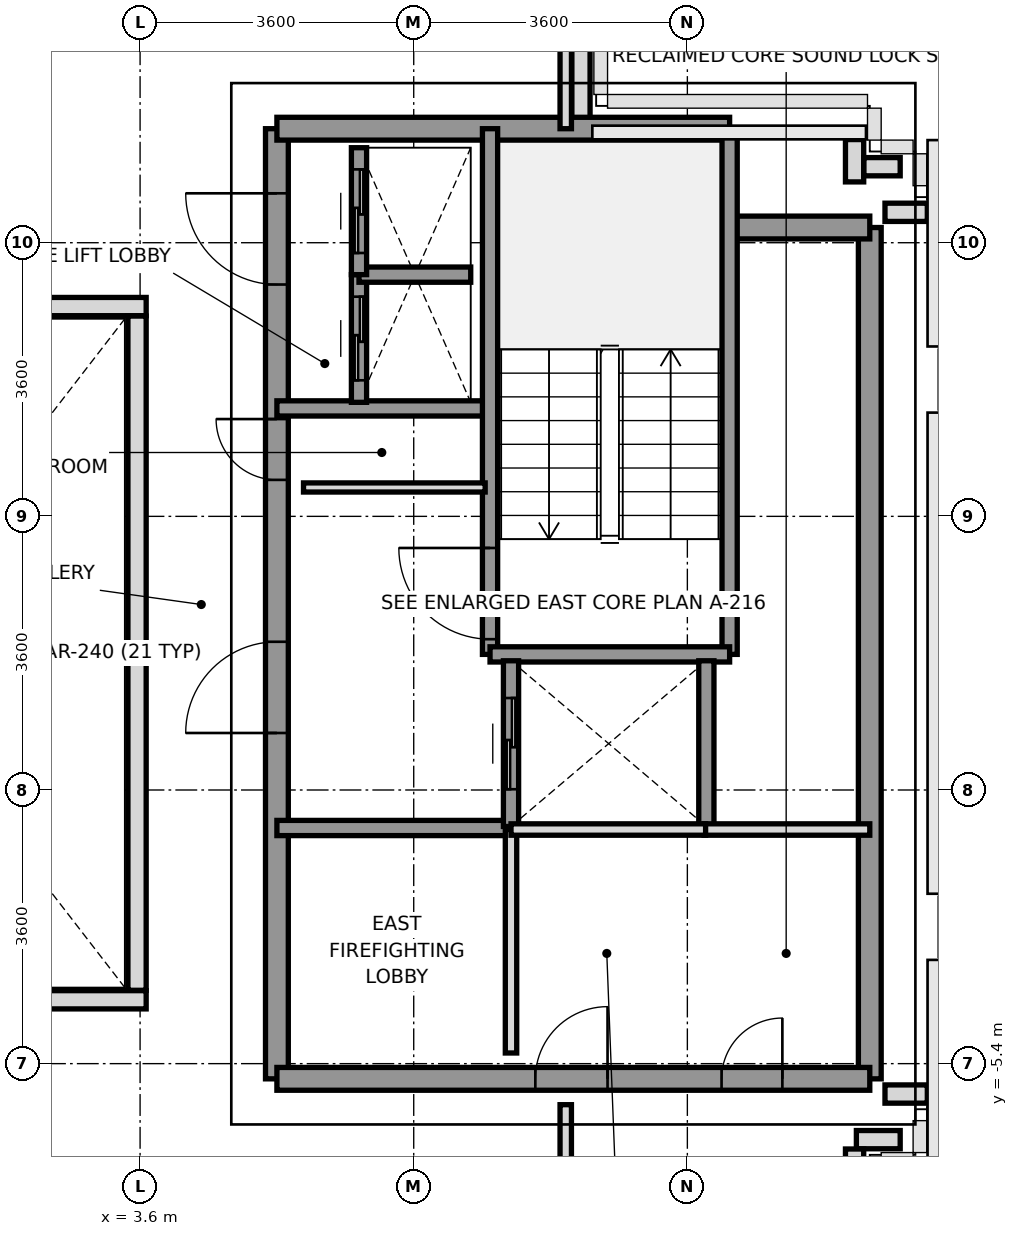
"""IFC4 building model, lengths in metres.
Left out: names, types, materials, properties, quantities, classifications, styles, units other than length and angle.
Written with IfcOpenShell. Run it as: python <this file> out.ifc"""

import sys

from ifc_helpers import new_model, si_unit, direction, frame, frame_2d, origin, place, context, subcontext, project, spatial, rectangle, extrude, source, transform, mapped, element, fill, save


model = new_model("IFC4")
c1 = context("Model", 3, precision=1e-05, world=origin(), true_north=direction((0.0, 1.0)))
c2 = subcontext(c1, "Body", "Model", "MODEL_VIEW")
j1 = project(units=[si_unit("LENGTHUNIT", "METRE"), si_unit("PLANEANGLEUNIT", "RADIAN")], contexts=[c1])
p1 = place(None, origin())
s1 = spatial("IfcSite", under=j1, at=p1, CompositionType="ELEMENT")
p2 = place(p1, origin())
s2 = spatial("IfcBuilding", under=s1, at=p2, CompositionType="ELEMENT")
p3 = place(p2, frame((0.0, 0.0, 265.2)))
s3 = spatial("IfcBuildingStorey", under=s2, at=p3, CompositionType="ELEMENT", Elevation=265.2)
p4 = place(p3, frame((13.957, -5.8, 0.0), z_axis=(0.0, 0.0, 1.0), x_axis=(-1.0, 0.0, 0.0)))
e1 = element("IfcWall", 1, at=p4, inside=s3, PredefinedType="PARAPET", context=c2, shape_type="SweptSolid", body=[
    extrude(rectangle(XDim=0.557, YDim=0.24, at=frame_2d((0.279, 0.0))), origin(), (0.0, 0.0, 1.0), 1.15),
])
p5 = place(p3, frame((13.6, -6.4, 0.0), z_axis=(0.0, 0.0, 1.0), x_axis=(-1.0, 0.0, 0.0)))
e2 = element("IfcWall", 2, at=p5, inside=s3, PredefinedType="PARAPET", context=c2, shape_type="SweptSolid", body=[
    extrude(rectangle(XDim=0.576, YDim=0.24, at=frame_2d((0.288, 0.0))), origin(), (0.0, 0.0, 1.0), 1.15),
])
p6 = place(p3, frame((13.0, -6.523, 0.0), z_axis=(0.0, 0.0, 1.0), x_axis=(0.0, -1.0, 0.0)))
e3 = element("IfcWall", 3, at=p6, inside=s3, PredefinedType="PARAPET", context=c2, shape_type="SweptSolid", body=[
    extrude(rectangle(XDim=0.234, YDim=0.24, at=frame_2d((0.117, 0.0))), origin(), (0.0, 0.0, 1.0), 1.15),
])
p7 = place(p3, frame((9.4, 8.622, 0.0), z_axis=(0.0, 0.0, 1.0), x_axis=(0.0, -1.0, 0.0)))
e4 = element("IfcWall", 4, at=p7, inside=s3, PredefinedType="PARAPET", context=c2, shape_type="SweptSolid", body=[
    extrude(rectangle(XDim=1.669, YDim=0.24, at=frame_2d((0.834, 0.0))), origin(), (0.0, 0.0, 1.0), 1.15),
])
p8 = place(p3, frame((13.0, 6.757, 0.0), z_axis=(0.0, 0.0, 1.0), x_axis=(0.0, -1.0, 0.0)))
e5 = element("IfcWall", 5, at=p8, inside=s3, PredefinedType="PARAPET", context=c2, shape_type="SweptSolid", body=[
    extrude(rectangle(XDim=0.557, YDim=0.24, at=frame_2d((0.279, 0.0))), origin(), (0.0, 0.0, 1.0), 1.15),
])
p9 = place(p3, frame((13.123, 6.4, 0.0), z_axis=(0.0, 0.0, 1.0), x_axis=(1.0, 0.0, 0.0)))
e6 = element("IfcWall", 6, at=p9, inside=s3, PredefinedType="PARAPET", context=c2, shape_type="SweptSolid", body=[
    extrude(rectangle(XDim=0.477, YDim=0.24, at=frame_2d((0.239, 0.0))), origin(), (0.0, 0.0, 1.0), 1.15),
])
p10 = place(p3, frame((13.4, 5.8, 0.0), z_axis=(0.0, 0.0, 1.0), x_axis=(1.0, 0.0, 0.0)))
e7 = element("IfcWall", 7, at=p10, inside=s3, PredefinedType="PARAPET", context=c2, shape_type="SweptSolid", body=[
    extrude(rectangle(XDim=0.557, YDim=0.24, at=frame_2d((0.279, 0.0))), origin(), (0.0, 0.0, 1.0), 1.15),
])
p11 = place(p3, frame((13.2, -5.6, 0.0), z_axis=(0.0, 0.0, 1.0), x_axis=(0.0, 1.0, 0.0)))
e8 = element("IfcWall", 8, at=p11, inside=s3, PredefinedType="SHEAR", context=c2, shape_type="SweptSolid", body=[
    extrude(rectangle(XDim=11.2, YDim=0.3, at=frame_2d((5.6, 0.0))), origin(), (0.0, 0.0, 1.0), 3.01),
])
p12 = place(p3, frame((5.4, -5.6, 0.0), z_axis=(0.0, 0.0, 1.0), x_axis=(0.0, 1.0, 0.0)))
e9 = element("IfcWall", 9, at=p12, inside=s3, PredefinedType="SHEAR", context=c2, shape_type="SweptSolid", body=[
    extrude(rectangle(XDim=12.5, YDim=0.3, at=frame_2d((6.25, 0.0))), origin(), (0.0, 0.0, 1.0), 3.01),
])
p13 = place(p12, frame((4.55, 0.0, 0.0)))
e10 = element("IfcOpeningElement", 10, at=p13, cuts=e9, PredefinedType="OPENING", context=c2, shape_type="SweptSolid", body=[
    extrude(rectangle(XDim=1.2, YDim=2.2, at=frame_2d((0.6, 1.1))), frame((0.0, 0.16, 0.0), z_axis=(0.0, -1.0, 0.0), x_axis=(1.0, 0.0, 0.0)), (0.0, 0.0, 1.0), 0.32),
])
p14 = place(p12, frame((10.45, 0.0, 0.0)))
e11 = element("IfcOpeningElement", 11, at=p14, cuts=e9, PredefinedType="OPENING", context=c2, shape_type="SweptSolid", body=[
    extrude(rectangle(XDim=1.2, YDim=2.2, at=frame_2d((0.6, 1.1))), frame((0.0, 0.16, 0.0), z_axis=(0.0, -1.0, 0.0), x_axis=(1.0, 0.0, 0.0)), (0.0, 0.0, 1.0), 0.32),
])
p15 = place(p12, frame((7.88, 0.0, 0.0)))
e12 = element("IfcOpeningElement", 12, at=p15, cuts=e9, PredefinedType="OPENING", context=c2, shape_type="SweptSolid", body=[
    extrude(rectangle(XDim=0.8, YDim=2.1, at=frame_2d((0.4, 1.05))), frame((0.0, 0.16, 0.0), z_axis=(0.0, -1.0, 0.0), x_axis=(1.0, 0.0, 0.0)), (0.0, 0.0, 1.0), 0.32),
])
p16 = place(p3, frame((5.4, 6.9, 0.0), z_axis=(0.0, 0.0, 1.0), x_axis=(1.0, 0.0, 0.0)))
e13 = element("IfcWall", 13, at=p16, inside=s3, PredefinedType="SHEAR", context=c2, shape_type="SweptSolid", body=[
    extrude(rectangle(XDim=5.956, YDim=0.3, at=frame_2d((2.978, 0.0))), origin(), (0.0, 0.0, 1.0), 3.01),
])
p17 = place(p3, frame((11.356, 5.6, 0.0), z_axis=(0.0, 0.0, 1.0), x_axis=(1.0, 0.0, 0.0)))
e14 = element("IfcWall", 14, at=p17, inside=s3, PredefinedType="SHEAR", context=c2, shape_type="SweptSolid", body=[
    extrude(rectangle(XDim=1.844, YDim=0.3, at=frame_2d((0.922, 0.0))), origin(), (0.0, 0.0, 1.0), 3.01),
])
p18 = place(p3, frame((5.4, -5.6, 0.0), z_axis=(0.0, 0.0, 1.0), x_axis=(1.0, 0.0, 0.0)))
e15 = element("IfcWall", 15, at=p18, inside=s3, PredefinedType="SHEAR", context=c2, shape_type="SweptSolid", body=[
    extrude(rectangle(XDim=7.8, YDim=0.3, at=frame_2d((3.9, 0.0))), origin(), (0.0, 0.0, 1.0), 3.01),
])
p19 = place(p18, frame((5.85, 0.0, 0.0)))
e16 = element("IfcOpeningElement", 16, at=p19, cuts=e15, PredefinedType="OPENING", context=c2, shape_type="SweptSolid", body=[
    extrude(rectangle(XDim=0.8, YDim=2.1, at=frame_2d((0.4, 1.05))), frame((0.0, 0.16, 0.0), z_axis=(0.0, -1.0, 0.0), x_axis=(1.0, 0.0, 0.0)), (0.0, 0.0, 1.0), 0.32),
])
p20 = place(p18, frame((3.4, 0.0, 0.0)))
e17 = element("IfcOpeningElement", 17, at=p20, cuts=e15, PredefinedType="OPENING", context=c2, shape_type="SweptSolid", body=[
    extrude(rectangle(XDim=0.95, YDim=2.15, at=frame_2d((0.475, 1.075))), frame((0.0, 0.16, 0.0), z_axis=(0.0, -1.0, 0.0), x_axis=(1.0, 0.0, 0.0)), (0.0, 0.0, 1.0), 0.32),
])
p21 = place(p3, frame((5.4, 3.22, 0.0), z_axis=(0.0, 0.0, 1.0), x_axis=(1.0, 0.0, 0.0)))
e18 = element("IfcWall", 18, at=p21, inside=s3, PredefinedType="SOLIDWALL", context=c2, shape_type="SweptSolid", body=[
    extrude(rectangle(XDim=2.78, YDim=0.2, at=frame_2d((1.39, 0.0))), origin(), (0.0, 0.0, 1.0), 3.01),
])
p22 = place(p3, frame((5.4, -2.3, 0.0), z_axis=(0.0, 0.0, 1.0), x_axis=(1.0, 0.0, 0.0)))
e19 = element("IfcWall", 19, at=p22, inside=s3, PredefinedType="SOLIDWALL", context=c2, shape_type="SweptSolid", body=[
    extrude(rectangle(XDim=3.08, YDim=0.2, at=frame_2d((1.54, 0.0))), origin(), (0.0, 0.0, 1.0), 3.01),
])
p23 = place(p3, frame((8.204, -0.016, 0.0), z_axis=(0.0, 0.0, 1.0), x_axis=(0.0, 1.0, 0.0)))
e20 = element("IfcWall", 20, at=p23, inside=s3, PredefinedType="SOLIDWALL", context=c2, shape_type="SweptSolid", body=[
    extrude(rectangle(XDim=6.916, YDim=0.2, at=frame_2d((3.458, 0.0))), origin(), (0.0, 0.0, 1.0), 3.01),
])
p24 = place(p23, frame((0.2, 0.0, 0.0)))
e21 = element("IfcOpeningElement", 21, at=p24, cuts=e20, PredefinedType="OPENING", context=c2, shape_type="SweptSolid", body=[
    extrude(rectangle(XDim=1.2, YDim=2.2, at=frame_2d((0.6, 1.1))), frame((0.0, 0.11, 0.0), z_axis=(0.0, -1.0, 0.0), x_axis=(1.0, 0.0, 0.0)), (0.0, 0.0, 1.0), 0.22),
])
p25 = place(p3, frame((11.356, -0.016, 0.0), z_axis=(0.0, 0.0, 1.0), x_axis=(0.0, 1.0, 0.0)))
e22 = element("IfcWall", 22, at=p25, inside=s3, PredefinedType="SOLIDWALL", context=c2, shape_type="SweptSolid", body=[
    extrude(rectangle(XDim=6.916, YDim=0.2, at=frame_2d((3.458, 0.0))), origin(), (0.0, 0.0, 1.0), 3.01),
])
p26 = place(p3, frame((8.204, -0.016, 0.0), z_axis=(0.0, 0.0, 1.0), x_axis=(1.0, 0.0, 0.0)))
e23 = element("IfcWall", 23, at=p26, inside=s3, PredefinedType="SOLIDWALL", context=c2, shape_type="SweptSolid", body=[
    extrude(rectangle(XDim=3.152, YDim=0.2, at=frame_2d((1.576, 0.0))), origin(), (0.0, 0.0, 1.0), 3.01),
])
p27 = place(p3, frame((8.48, -2.28, 0.0), z_axis=(0.0, 0.0, 1.0), x_axis=(0.0, 1.0, 0.0)))
e24 = element("IfcWall", 24, at=p27, inside=s3, PredefinedType="SOLIDWALL", context=c2, shape_type="SweptSolid", body=[
    extrude(rectangle(XDim=2.18, YDim=0.2, at=frame_2d((1.09, 0.0))), origin(), (0.0, 0.0, 1.0), 3.01),
])
p28 = place(p27, frame((0.49, 0.0, 0.0)))
e25 = element("IfcOpeningElement", 25, at=p28, cuts=e24, PredefinedType="OPENING", context=c2, shape_type="SweptSolid", body=[
    extrude(rectangle(XDim=1.2, YDim=2.2, at=frame_2d((0.6, 1.1))), frame((0.0, 0.11, 0.0), z_axis=(0.0, -1.0, 0.0), x_axis=(1.0, 0.0, 0.0)), (0.0, 0.0, 1.0), 0.22),
])
p29 = place(p3, frame((11.05, -2.28, 0.0), z_axis=(0.0, 0.0, 1.0), x_axis=(0.0, 1.0, 0.0)))
e26 = element("IfcWall", 26, at=p29, inside=s3, PredefinedType="SOLIDWALL", context=c2, shape_type="SweptSolid", body=[
    extrude(rectangle(XDim=2.18, YDim=0.2, at=frame_2d((1.09, 0.0))), origin(), (0.0, 0.0, 1.0), 3.01),
])
p30 = place(p3, frame((6.48, 3.3, 0.0), z_axis=(0.0, 0.0, 1.0), x_axis=(0.0, 1.0, 0.0)))
e27 = element("IfcWall", 27, at=p30, inside=s3, PredefinedType="SOLIDWALL", context=c2, shape_type="SweptSolid", body=[
    extrude(rectangle(XDim=1.68, YDim=0.2, at=frame_2d((0.84, 0.0))), origin(), (0.0, 0.0, 1.0), 3.01),
])
p31 = place(p30, frame((0.29, 0.0, 0.0)))
e28 = element("IfcOpeningElement", 28, at=p31, cuts=e27, PredefinedType="OPENING", context=c2, shape_type="SweptSolid", body=[
    extrude(rectangle(XDim=1.1, YDim=2.2, at=frame_2d((0.55, 1.1))), frame((0.0, 0.11, 0.0), z_axis=(0.0, -1.0, 0.0), x_axis=(1.0, 0.0, 0.0)), (0.0, 0.0, 1.0), 0.22),
])
p32 = place(p3, frame((6.48, 4.98, 0.0), z_axis=(0.0, 0.0, 1.0), x_axis=(1.0, 0.0, 0.0)))
e29 = element("IfcWall", 29, at=p32, inside=s3, PredefinedType="SOLIDWALL", context=c2, shape_type="SweptSolid", body=[
    extrude(rectangle(XDim=1.47, YDim=0.2, at=frame_2d((0.735, 0.0))), origin(), (0.0, 0.0, 1.0), 3.01),
])
p33 = place(p3, frame((6.48, 4.98, 0.0), z_axis=(0.0, 0.0, 1.0), x_axis=(0.0, 1.0, 0.0)))
e30 = element("IfcWall", 30, at=p33, inside=s3, PredefinedType="SOLIDWALL", context=c2, shape_type="SweptSolid", body=[
    extrude(rectangle(XDim=1.67, YDim=0.2, at=frame_2d((0.835, 0.0))), origin(), (0.0, 0.0, 1.0), 3.01),
])
p34 = place(p33, frame((0.285, 0.0, 0.0)))
e31 = element("IfcOpeningElement", 31, at=p34, cuts=e30, PredefinedType="OPENING", context=c2, shape_type="SweptSolid", body=[
    extrude(rectangle(XDim=1.1, YDim=2.2, at=frame_2d((0.55, 1.1))), frame((0.0, 0.11, 0.0), z_axis=(0.0, -1.0, 0.0), x_axis=(1.0, 0.0, 0.0)), (0.0, 0.0, 1.0), 0.22),
])
p35 = place(p3, frame((5.75, 2.18, 0.0), z_axis=(0.0, 0.0, 1.0), x_axis=(1.0, 0.0, 0.0)))
e32 = element("IfcWall", 32, at=p35, inside=s3, PredefinedType="PARTITIONING", context=c2, shape_type="SweptSolid", body=[
    extrude(rectangle(XDim=2.39, YDim=0.12, at=frame_2d((1.195, 0.0))), origin(), (0.0, 0.0, 1.0), 3.01),
])
p36 = place(p3, frame((11.02, -2.32, 0.0), z_axis=(0.0, 0.0, 1.0), x_axis=(1.0, 0.0, 0.0)))
e33 = element("IfcWall", 33, at=p36, inside=s3, PredefinedType="PARTITIONING", context=c2, shape_type="SweptSolid", body=[
    extrude(rectangle(XDim=2.18, YDim=0.15, at=frame_2d((1.09, 0.0))), origin(), (0.0, 0.0, 1.0), 3.01),
])
p37 = place(p3, frame((8.48, -5.26, 0.0), z_axis=(0.0, 0.0, 1.0), x_axis=(0.0, 1.0, 0.0)))
e34 = element("IfcWall", 34, at=p37, inside=s3, PredefinedType="PARTITIONING", context=c2, shape_type="SweptSolid", body=[
    extrude(rectangle(XDim=2.94, YDim=0.15, at=frame_2d((1.47, 0.0))), origin(), (0.0, 0.0, 1.0), 3.01),
])
p38 = place(p3, frame((8.48, -2.32, 0.0), z_axis=(0.0, 0.0, 1.0), x_axis=(1.0, 0.0, 0.0)))
e35 = element("IfcWall", 35, at=p38, inside=s3, PredefinedType="PARTITIONING", context=c2, shape_type="SweptSolid", body=[
    extrude(rectangle(XDim=2.56, YDim=0.15, at=frame_2d((1.28, 0.0))), origin(), (0.0, 0.0, 1.0), 3.01),
])
p39 = place(p3, frame((9.2, 6.9, 0.0), z_axis=(0.0, 0.0, 1.0), x_axis=(0.0, 1.0, 0.0)))
e36 = element("IfcWall", 36, at=p39, inside=s3, PredefinedType="PARTITIONING", context=c2, shape_type="SweptSolid", body=[
    extrude(rectangle(XDim=3.38, YDim=0.15, at=frame_2d((1.69, 0.0))), origin(), (0.0, 0.0, 1.0), 2.61),
])
p40 = place(p3, frame((9.2, -10.28, 0.0), z_axis=(0.0, 0.0, 1.0), x_axis=(0.0, 1.0, 0.0)))
e37 = element("IfcWall", 37, at=p40, inside=s3, PredefinedType="PARTITIONING", context=c2, shape_type="SweptSolid", body=[
    extrude(rectangle(XDim=4.34, YDim=0.15, at=frame_2d((2.17, 0.0))), origin(), (0.0, 0.0, 1.0), 2.61),
])
for number, where, z_axis, x_axis in (
    (38, (-3.68, -4.56, 0.0), (0.0, 0.0, 1.0), (1.0, 0.0, 0.0)),
    (39, (-3.68, 4.56, 0.0), (0.0, 0.0, 1.0), (1.0, 0.0, 0.0)),
):
    element("IfcWall", number, at=place(p3, frame(where, z_axis=z_axis, x_axis=x_axis)), inside=s3, PredefinedType="PARAPET", context=c2, shape_type="SweptSolid", body=[
        extrude(rectangle(XDim=7.36, YDim=0.24, at=frame_2d((3.68, 0.0))), origin(), (0.0, 0.0, 1.0), 1.15),
    ])
p41 = place(p3, frame((3.56, -4.435, 0.0), z_axis=(0.0, 0.0, 1.0), x_axis=(0.0, 1.0, 0.0)))
e40 = element("IfcWall", 40, at=p41, inside=s3, PredefinedType="PARAPET", context=c2, shape_type="SweptSolid", body=[
    extrude(rectangle(XDim=8.87, YDim=0.24, at=frame_2d((4.435, 0.0))), origin(), (0.0, 0.0, 1.0), 1.15),
])
m1 = source(origin(), c2, "Body", "SweptSolid", [
    extrude(rectangle(XDim=1.2, YDim=2.2, at=frame_2d((0.6, 1.1))), frame((0.0, 0.025, 0.0), z_axis=(0.0, -1.0, 0.0), x_axis=(1.0, 0.0, 0.0)), (0.0, 0.0, 1.0), 0.05),
])
p42 = place(p24, origin())
e41 = element("IfcDoor", 41, at=p42, inside=s3, OperationType="SINGLE_SWING_RIGHT", PredefinedType="DOOR", context=c2, shape_type="MappedRepresentation", body=[
    mapped(m1, transform((0.0, 0.0, 0.0), x_axis=(1.0, 0.0, 0.0), y_axis=(0.0, 1.0, 0.0), z_axis=(0.0, 0.0, 1.0), scale=1.0)),
])
fill(e21, e41)
p43 = place(p13, origin())
e42 = element("IfcDoor", 42, at=p43, inside=s3, OperationType="SINGLE_SWING_LEFT", PredefinedType="DOOR", context=c2, shape_type="MappedRepresentation", body=[
    mapped(m1, transform((0.0, 0.0, 0.0), x_axis=(1.0, 0.0, 0.0), y_axis=(0.0, 1.0, 0.0), z_axis=(0.0, 0.0, 1.0), scale=1.0)),
])
fill(e10, e42)
p44 = place(p14, origin())
e43 = element("IfcDoor", 43, at=p44, inside=s3, OperationType="SINGLE_SWING_RIGHT", PredefinedType="DOOR", context=c2, shape_type="MappedRepresentation", body=[
    mapped(m1, transform((0.0, 0.0, 0.0), x_axis=(1.0, 0.0, 0.0), y_axis=(0.0, 1.0, 0.0), z_axis=(0.0, 0.0, 1.0), scale=1.0)),
])
fill(e11, e43)
m2 = source(origin(), c2, "Body", "SweptSolid", [
    extrude(rectangle(XDim=0.8, YDim=2.1, at=frame_2d((0.4, 1.05))), frame((0.0, 0.025, 0.0), z_axis=(0.0, -1.0, 0.0), x_axis=(1.0, 0.0, 0.0)), (0.0, 0.0, 1.0), 0.05),
])
p45 = place(p15, origin())
e44 = element("IfcDoor", 44, at=p45, inside=s3, OperationType="SINGLE_SWING_RIGHT", PredefinedType="DOOR", context=c2, shape_type="MappedRepresentation", body=[
    mapped(m2, transform((0.0, 0.0, 0.0), x_axis=(1.0, 0.0, 0.0), y_axis=(0.0, 1.0, 0.0), z_axis=(0.0, 0.0, 1.0), scale=1.0)),
])
fill(e12, e44)
p46 = place(p19, origin())
e45 = element("IfcDoor", 45, at=p46, inside=s3, OperationType="SINGLE_SWING_RIGHT", PredefinedType="DOOR", context=c2, shape_type="MappedRepresentation", body=[
    mapped(m2, transform((0.0, 0.0, 0.0), x_axis=(1.0, 0.0, 0.0), y_axis=(0.0, 1.0, 0.0), z_axis=(0.0, 0.0, 1.0), scale=1.0)),
])
fill(e16, e45)
m3 = source(origin(), c2, "Body", "SweptSolid", [
    extrude(rectangle(XDim=0.95, YDim=2.15, at=frame_2d((0.475, 1.075))), frame((0.0, 0.025, 0.0), z_axis=(0.0, -1.0, 0.0), x_axis=(1.0, 0.0, 0.0)), (0.0, 0.0, 1.0), 0.05),
])
p47 = place(p20, origin())
e46 = element("IfcDoor", 46, at=p47, inside=s3, OperationType="SINGLE_SWING_RIGHT", PredefinedType="DOOR", context=c2, shape_type="MappedRepresentation", body=[
    mapped(m3, transform((0.0, 0.0, 0.0), x_axis=(1.0, 0.0, 0.0), y_axis=(0.0, 1.0, 0.0), z_axis=(0.0, 0.0, 1.0), scale=1.0)),
])
fill(e17, e46)
p48 = place(p28, origin())
e47 = element("IfcDoor", 47, at=p48, inside=s3, OperationType="SLIDING_TO_RIGHT", PredefinedType="DOOR", context=c2, shape_type="MappedRepresentation", body=[
    mapped(m1, transform((0.0, 0.0, 0.0), x_axis=(1.0, 0.0, 0.0), y_axis=(0.0, 1.0, 0.0), z_axis=(0.0, 0.0, 1.0), scale=1.0)),
])
fill(e25, e47)
m4 = source(origin(), c2, "Body", "SweptSolid", [
    extrude(rectangle(XDim=1.1, YDim=2.2, at=frame_2d((0.55, 1.1))), frame((0.0, 0.025, 0.0), z_axis=(0.0, -1.0, 0.0), x_axis=(1.0, 0.0, 0.0)), (0.0, 0.0, 1.0), 0.05),
])
p49 = place(p31, origin())
e48 = element("IfcDoor", 48, at=p49, inside=s3, OperationType="SLIDING_TO_LEFT", PredefinedType="DOOR", context=c2, shape_type="MappedRepresentation", body=[
    mapped(m4, transform((0.0, 0.0, 0.0), x_axis=(1.0, 0.0, 0.0), y_axis=(0.0, 1.0, 0.0), z_axis=(0.0, 0.0, 1.0), scale=1.0)),
])
fill(e28, e48)
p50 = place(p34, origin())
e49 = element("IfcDoor", 49, at=p50, inside=s3, OperationType="SLIDING_TO_LEFT", PredefinedType="DOOR", context=c2, shape_type="MappedRepresentation", body=[
    mapped(m4, transform((0.0, 0.0, 0.0), x_axis=(1.0, 0.0, 0.0), y_axis=(0.0, 1.0, 0.0), z_axis=(0.0, 0.0, 1.0), scale=1.0)),
])
fill(e31, e49)
save(model, sys.argv[1])
